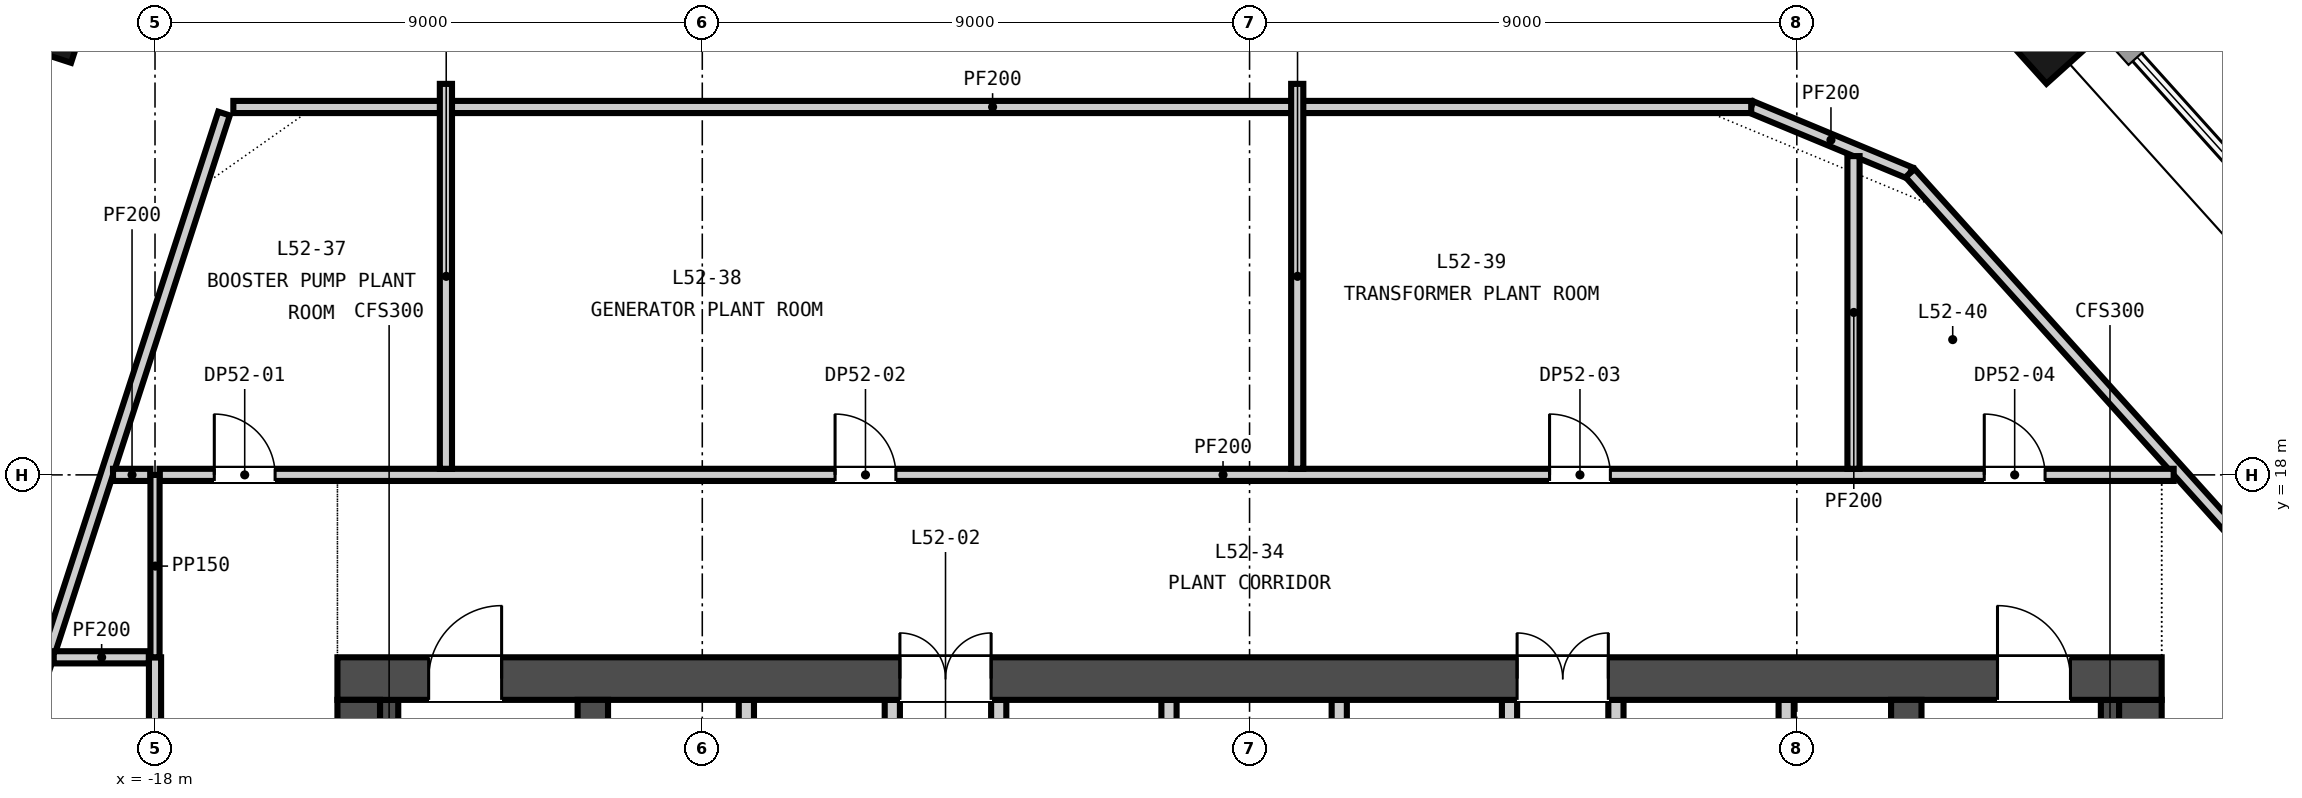
"""IFC4 building model, lengths in metres.
Left out: names, types, materials, properties, quantities, classifications, styles, units other than length and angle.
Written with IfcOpenShell. Run it as: python <this file> out.ifc"""

import sys

from ifc_helpers import new_model, si_unit, direction, frame, frame_2d, origin, origin_2d, place, context, subcontext, project, spatial, rectangle, extrude, element, fill, save


model = new_model("IFC4")
c1 = context("Model", 3, precision=1e-05, world=origin(), true_north=direction((0.0, 1.0)))
c2 = subcontext(c1, "Body", "Model", "MODEL_VIEW")
j1 = project(units=[si_unit("LENGTHUNIT", "METRE"), si_unit("PLANEANGLEUNIT", "RADIAN")], contexts=[c1])
p1 = place(None, origin())
s1 = spatial("IfcSite", under=j1, at=p1, CompositionType="ELEMENT")
p2 = place(p1, origin())
s2 = spatial("IfcBuilding", under=s1, at=p2, CompositionType="ELEMENT")
p3 = place(p2, frame((0.0, 0.0, 207.3)))
s3 = spatial("IfcBuildingStorey", under=s2, at=p3, CompositionType="ELEMENT", Elevation=207.3)
p4 = place(p3, frame((-15.0, 14.65, -0.3), z_axis=(0.0, 0.0, 1.0), x_axis=(1.0, 0.0, 0.0)))
e1 = element("IfcWall", 1, at=p4, inside=s3, PredefinedType="SOLIDWALL", context=c2, shape_type="SweptSolid", body=[
    extrude(rectangle(XDim=30.0, YDim=0.7, at=frame_2d((15.0, 0.0))), origin(), (0.0, 0.0, 1.0), 4.5),
])
p5 = place(p4, frame((9.25, 0.0, 0.3)))
e2 = element("IfcOpeningElement", 2, at=p5, cuts=e1, PredefinedType="OPENING", context=c2, shape_type="SweptSolid", body=[
    extrude(rectangle(XDim=1.5, YDim=2.1, at=frame_2d((0.75, 1.05))), frame((0.0, 0.36, 0.0), z_axis=(0.0, -1.0, 0.0), x_axis=(1.0, 0.0, 0.0)), (0.0, 0.0, 1.0), 0.72),
])
p6 = place(p4, frame((19.4, 0.0, 0.3)))
e3 = element("IfcOpeningElement", 3, at=p6, cuts=e1, PredefinedType="OPENING", context=c2, shape_type="SweptSolid", body=[
    extrude(rectangle(XDim=1.5, YDim=2.1, at=frame_2d((0.75, 1.05))), frame((0.0, 0.36, 0.0), z_axis=(0.0, -1.0, 0.0), x_axis=(1.0, 0.0, 0.0)), (0.0, 0.0, 1.0), 0.72),
])
p7 = place(p4, frame((1.5, 0.0, 0.3)))
e4 = element("IfcOpeningElement", 4, at=p7, cuts=e1, PredefinedType="OPENING", context=c2, shape_type="SweptSolid", body=[
    extrude(rectangle(XDim=1.2, YDim=2.1, at=frame_2d((0.6, 1.05))), frame((0.0, 0.36, 0.0), z_axis=(0.0, -1.0, 0.0), x_axis=(1.0, 0.0, 0.0)), (0.0, 0.0, 1.0), 0.72),
])
p8 = place(p4, frame((27.3, 0.0, 0.3)))
e5 = element("IfcOpeningElement", 5, at=p8, cuts=e1, PredefinedType="OPENING", context=c2, shape_type="SweptSolid", body=[
    extrude(rectangle(XDim=1.2, YDim=2.1, at=frame_2d((0.6, 1.05))), frame((0.0, 0.36, 0.0), z_axis=(0.0, -1.0, 0.0), x_axis=(1.0, 0.0, 0.0)), (0.0, 0.0, 1.0), 0.72),
])
for number, where, z_axis, x_axis in (
    (6, (-14.65, 0.7, -0.3), (0.0, 0.0, 1.0), (0.0, 1.0, 0.0)),
    (7, (14.65, 0.7, -0.3), (0.0, 0.0, 1.0), (0.0, 1.0, 0.0)),
):
    element("IfcWall", number, at=place(p3, frame(where, z_axis=z_axis, x_axis=x_axis)), inside=s3, PredefinedType="SOLIDWALL", context=c2, shape_type="SweptSolid", body=[
        extrude(rectangle(XDim=13.6, YDim=0.7, at=frame_2d((6.8, 0.0))), origin(), (0.0, 0.0, 1.0), 4.5),
    ])
for number, where, z_axis, x_axis in (
    (8, (-10.8, 0.7, -0.3), (0.0, 0.0, 1.0), (0.0, 1.0, 0.0)),
    (9, (10.8, 0.7, -0.3), (0.0, 0.0, 1.0), (0.0, 1.0, 0.0)),
):
    element("IfcWall", number, at=place(p3, frame(where, z_axis=z_axis, x_axis=x_axis)), inside=s3, PredefinedType="SOLIDWALL", context=c2, shape_type="SweptSolid", body=[
        extrude(rectangle(XDim=13.6, YDim=0.5, at=frame_2d((6.8, 0.0))), origin(), (0.0, 0.0, 1.0), 4.5),
    ])
for number, where, z_axis, x_axis in (
    (10, (-19.798, 25.596, -0.3), (0.0, 0.0, 1.0), (-0.309, -0.951, 0.0)),
    (11, (13.154, 25.351, -0.3), (0.0, 0.0, 1.0), (-0.669, 0.743, 0.0)),
):
    element("IfcColumn", number, at=place(p3, frame(where, z_axis=z_axis, x_axis=x_axis)), inside=s3, PredefinedType="COLUMN", context=c2, shape_type="SweptSolid", body=[
        extrude(rectangle(XDim=1.3, YDim=1.3, at=origin_2d()), origin(), (0.0, 0.0, 1.0), 4.5),
    ])
for number, where, z_axis, x_axis in (
    (12, (-8.275, 11.3, 0.0), (0.0, 0.0, 1.0), (0.0, 1.0, 0.0)),
    (13, (-5.875, 11.3, 0.0), (0.0, 0.0, 1.0), (0.0, 1.0, 0.0)),
    (14, (-4.125, 11.3, 0.0), (0.0, 0.0, 1.0), (0.0, 1.0, 0.0)),
    (15, (-1.325, 11.3, 0.0), (0.0, 0.0, 1.0), (0.0, 1.0, 0.0)),
    (16, (1.475, 11.3, 0.0), (0.0, 0.0, 1.0), (0.0, 1.0, 0.0)),
    (17, (4.275, 11.3, 0.0), (0.0, 0.0, 1.0), (0.0, 1.0, 0.0)),
    (18, (6.025, 11.3, 0.0), (0.0, 0.0, 1.0), (0.0, 1.0, 0.0)),
    (19, (8.825, 11.3, 0.0), (0.0, 0.0, 1.0), (0.0, 1.0, 0.0)),
):
    element("IfcWall", number, at=place(p3, frame(where, z_axis=z_axis, x_axis=x_axis)), inside=s3, PredefinedType="PARTITIONING", context=c2, shape_type="SweptSolid", body=[
        extrude(rectangle(XDim=3.0, YDim=0.25, at=frame_2d((1.5, 0.0))), origin(), (0.0, 0.0, 1.0), 4.2),
    ])
for number, where, z_axis, x_axis in (
    (20, (-14.15, 0.7, 0.0), (0.0, 0.0, 1.0), (0.0, 1.0, 0.0)),
    (21, (14.15, 0.7, 0.0), (0.0, 0.0, 1.0), (0.0, 1.0, 0.0)),
):
    element("IfcWall", number, at=place(p3, frame(where, z_axis=z_axis, x_axis=x_axis)), inside=s3, PredefinedType="SOLIDWALL", context=c2, shape_type="SweptSolid", body=[
        extrude(rectangle(XDim=13.6, YDim=0.3, at=frame_2d((6.8, 0.0))), origin(), (0.0, 0.0, 1.0), 4.2),
    ])
p9 = place(p3, frame((-19.665, 15.0, 0.0), z_axis=(0.0, 0.0, 1.0), x_axis=(1.0, 0.0, 0.0)))
e22 = element("IfcWall", 22, at=p9, inside=s3, PredefinedType="PARTITIONING", context=c2, shape_type="SweptSolid", body=[
    extrude(rectangle(XDim=1.565, YDim=0.2, at=frame_2d((0.783, 0.0))), origin(), (0.0, 0.0, 1.0), 4.2),
])
p10 = place(p3, frame((-18.691, 18.0, 0.0), z_axis=(0.0, 0.0, 1.0), x_axis=(1.0, 0.0, 0.0)))
e23 = element("IfcWall", 23, at=p10, inside=s3, PredefinedType="PARTITIONING", context=c2, shape_type="SweptSolid", body=[
    extrude(rectangle(XDim=0.616, YDim=0.2, at=frame_2d((0.308, 0.0))), origin(), (0.0, 0.0, 1.0), 4.2),
])
p11 = place(p3, frame((-17.925, 18.0, 0.0), z_axis=(0.0, 0.0, 1.0), x_axis=(1.0, 0.0, 0.0)))
e24 = element("IfcWall", 24, at=p11, inside=s3, PredefinedType="PARTITIONING", context=c2, shape_type="SweptSolid", body=[
    extrude(rectangle(XDim=33.122, YDim=0.2, at=frame_2d((16.561, 0.0))), origin(), (0.0, 0.0, 1.0), 4.2),
])
p12 = place(p11, frame((0.9, 0.0, 0.0)))
e25 = element("IfcOpeningElement", 25, at=p12, cuts=e24, PredefinedType="OPENING", context=c2, shape_type="SweptSolid", body=[
    extrude(rectangle(XDim=1.0, YDim=2.1, at=frame_2d((0.5, 1.05))), frame((0.0, 0.11, 0.0), z_axis=(0.0, -1.0, 0.0), x_axis=(1.0, 0.0, 0.0)), (0.0, 0.0, 1.0), 0.22),
])
p13 = place(p11, frame((11.109, 0.0, 0.0)))
e26 = element("IfcOpeningElement", 26, at=p13, cuts=e24, PredefinedType="OPENING", context=c2, shape_type="SweptSolid", body=[
    extrude(rectangle(XDim=1.0, YDim=2.1, at=frame_2d((0.5, 1.05))), frame((0.0, 0.11, 0.0), z_axis=(0.0, -1.0, 0.0), x_axis=(1.0, 0.0, 0.0)), (0.0, 0.0, 1.0), 0.22),
])
p14 = place(p11, frame((22.859, 0.0, 0.0)))
e27 = element("IfcOpeningElement", 27, at=p14, cuts=e24, PredefinedType="OPENING", context=c2, shape_type="SweptSolid", body=[
    extrude(rectangle(XDim=1.0, YDim=2.1, at=frame_2d((0.5, 1.05))), frame((0.0, 0.11, 0.0), z_axis=(0.0, -1.0, 0.0), x_axis=(1.0, 0.0, 0.0)), (0.0, 0.0, 1.0), 0.22),
])
p15 = place(p11, frame((30.008, 0.0, 0.0)))
e28 = element("IfcOpeningElement", 28, at=p15, cuts=e24, PredefinedType="OPENING", context=c2, shape_type="SweptSolid", body=[
    extrude(rectangle(XDim=1.0, YDim=2.1, at=frame_2d((0.5, 1.05))), frame((0.0, 0.11, 0.0), z_axis=(0.0, -1.0, 0.0), x_axis=(1.0, 0.0, 0.0)), (0.0, 0.0, 1.0), 0.22),
])
p16 = place(p3, frame((-18.0, 0.0, 0.0), z_axis=(0.0, 0.0, 1.0), x_axis=(0.0, 1.0, 0.0)))
e29 = element("IfcWall", 29, at=p16, inside=s3, PredefinedType="PARTITIONING", context=c2, shape_type="SweptSolid", body=[
    extrude(rectangle(XDim=15.0, YDim=0.2, at=frame_2d((7.5, 0.0))), origin(), (0.0, 0.0, 1.0), 4.2),
])
p17 = place(p16, frame((6.9, 0.0, 0.0)))
e30 = element("IfcOpeningElement", 30, at=p17, cuts=e29, PredefinedType="OPENING", context=c2, shape_type="SweptSolid", body=[
    extrude(rectangle(XDim=1.0, YDim=2.1, at=frame_2d((0.5, 1.05))), frame((0.0, 0.11, 0.0), z_axis=(0.0, -1.0, 0.0), x_axis=(1.0, 0.0, 0.0)), (0.0, 0.0, 1.0), 0.22),
])
p18 = place(p3, frame((-18.0, 15.001, 0.0), z_axis=(0.0, 0.0, 1.0), x_axis=(0.0, 1.0, 0.0)))
e31 = element("IfcWall", 31, at=p18, inside=s3, PredefinedType="PARTITIONING", context=c2, shape_type="SweptSolid", body=[
    extrude(rectangle(XDim=2.998, YDim=0.15, at=frame_2d((1.499, 0.0))), origin(), (0.0, 0.0, 1.0), 4.2),
])
for number, where, z_axis, x_axis in (
    (32, (-13.216, 18.1, 0.0), (0.0, 0.0, 1.0), (0.0, 1.0, 0.0)),
    (33, (0.784, 18.1, 0.0), (0.0, 0.0, 1.0), (0.0, 1.0, 0.0)),
):
    element("IfcWall", number, at=place(p3, frame(where, z_axis=z_axis, x_axis=x_axis)), inside=s3, PredefinedType="PARTITIONING", context=c2, shape_type="SweptSolid", body=[
        extrude(rectangle(XDim=6.33, YDim=0.2, at=frame_2d((3.165, 0.0))), origin(), (0.0, 0.0, 1.0), 4.2),
    ])
p19 = place(p3, frame((9.932, 18.1, 0.0), z_axis=(0.0, 0.0, 1.0), x_axis=(0.0, 1.0, 0.0)))
e34 = element("IfcWall", 34, at=p19, inside=s3, PredefinedType="PARTITIONING", context=c2, shape_type="SweptSolid", body=[
    extrude(rectangle(XDim=5.142, YDim=0.2, at=frame_2d((2.571, 0.0))), origin(), (0.0, 0.0, 1.0), 4.2),
])
p20 = place(p3, frame((8.25, 24.05, 0.0), z_axis=(0.0, 0.0, 1.0), x_axis=(0.923344746626, -0.383971976683, 0.0)))
e35 = element("IfcWall", 35, at=p20, inside=s3, PredefinedType="PARTITIONING", context=c2, shape_type="SweptSolid", body=[
    extrude(rectangle(XDim=2.829, YDim=0.2, at=frame_2d((1.415, 0.0))), origin(), (0.0, 0.0, 1.0), 4.2),
])
p21 = place(p3, frame((10.863, 22.964, 0.0), z_axis=(0.0, 0.0, 1.0), x_axis=(0.669131375447, -0.743144132987, 0.0)))
e36 = element("IfcWall", 36, at=p21, inside=s3, PredefinedType="PARTITIONING", context=c2, shape_type="SweptSolid", body=[
    extrude(rectangle(XDim=27.355, YDim=0.2, at=frame_2d((13.678, 0.0))), origin(), (0.0, 0.0, 1.0), 4.2),
])
p22 = place(p3, frame((-25.318, -2.075, 0.0), z_axis=(0.0, 0.0, 1.0), x_axis=(0.309016450058, 0.951056693154, 0.0)))
e37 = element("IfcWall", 37, at=p22, inside=s3, PredefinedType="PARTITIONING", context=c2, shape_type="SweptSolid", body=[
    extrude(rectangle(XDim=27.356, YDim=0.2, at=frame_2d((13.678, 0.0))), origin(), (0.0, 0.0, 1.0), 4.2),
])
p23 = place(p3, frame((-16.712, 24.05, 0.0), z_axis=(0.0, 0.0, 1.0), x_axis=(1.0, 0.0, 0.0)))
e38 = element("IfcWall", 38, at=p23, inside=s3, PredefinedType="PARTITIONING", context=c2, shape_type="SweptSolid", body=[
    extrude(rectangle(XDim=24.962, YDim=0.2, at=frame_2d((12.481, 0.0))), origin(), (0.0, 0.0, 1.0), 4.2),
])
p24 = place(p5, origin())
e39 = element("IfcDoor", 39, at=p24, inside=s3, OperationType="DOUBLE_DOOR_SINGLE_SWING", PredefinedType="DOOR", context=c2, shape_type="SweptSolid", body=[
    extrude(rectangle(XDim=1.5, YDim=2.1, at=frame_2d((0.75, 1.05))), frame((0.0, 0.025, 0.0), z_axis=(0.0, -1.0, 0.0), x_axis=(1.0, 0.0, 0.0)), (0.0, 0.0, 1.0), 0.05),
])
fill(e2, e39)
p25 = place(p6, origin())
e40 = element("IfcDoor", 40, at=p25, inside=s3, OperationType="DOUBLE_DOOR_SINGLE_SWING", PredefinedType="DOOR", context=c2, shape_type="SweptSolid", body=[
    extrude(rectangle(XDim=1.5, YDim=2.1, at=frame_2d((0.75, 1.05))), frame((0.0, 0.025, 0.0), z_axis=(0.0, -1.0, 0.0), x_axis=(1.0, 0.0, 0.0)), (0.0, 0.0, 1.0), 0.05),
])
fill(e3, e40)
p26 = place(p7, origin())
e41 = element("IfcDoor", 41, at=p26, inside=s3, OperationType="SINGLE_SWING_RIGHT", PredefinedType="DOOR", context=c2, shape_type="SweptSolid", body=[
    extrude(rectangle(XDim=1.2, YDim=2.1, at=frame_2d((0.6, 1.05))), frame((0.0, 0.025, 0.0), z_axis=(0.0, -1.0, 0.0), x_axis=(1.0, 0.0, 0.0)), (0.0, 0.0, 1.0), 0.05),
])
fill(e4, e41)
p27 = place(p8, origin())
e42 = element("IfcDoor", 42, at=p27, inside=s3, OperationType="SINGLE_SWING_LEFT", PredefinedType="DOOR", context=c2, shape_type="SweptSolid", body=[
    extrude(rectangle(XDim=1.2, YDim=2.1, at=frame_2d((0.6, 1.05))), frame((0.0, 0.025, 0.0), z_axis=(0.0, -1.0, 0.0), x_axis=(1.0, 0.0, 0.0)), (0.0, 0.0, 1.0), 0.05),
])
fill(e5, e42)
p28 = place(p12, origin())
e43 = element("IfcDoor", 43, at=p28, inside=s3, OperationType="SINGLE_SWING_LEFT", PredefinedType="DOOR", context=c2, shape_type="SweptSolid", body=[
    extrude(rectangle(XDim=1.0, YDim=2.1, at=frame_2d((0.5, 1.05))), frame((0.0, 0.025, 0.0), z_axis=(0.0, -1.0, 0.0), x_axis=(1.0, 0.0, 0.0)), (0.0, 0.0, 1.0), 0.05),
])
fill(e25, e43)
p29 = place(p13, origin())
e44 = element("IfcDoor", 44, at=p29, inside=s3, OperationType="SINGLE_SWING_LEFT", PredefinedType="DOOR", context=c2, shape_type="SweptSolid", body=[
    extrude(rectangle(XDim=1.0, YDim=2.1, at=frame_2d((0.5, 1.05))), frame((0.0, 0.025, 0.0), z_axis=(0.0, -1.0, 0.0), x_axis=(1.0, 0.0, 0.0)), (0.0, 0.0, 1.0), 0.05),
])
fill(e26, e44)
p30 = place(p14, origin())
e45 = element("IfcDoor", 45, at=p30, inside=s3, OperationType="SINGLE_SWING_LEFT", PredefinedType="DOOR", context=c2, shape_type="SweptSolid", body=[
    extrude(rectangle(XDim=1.0, YDim=2.1, at=frame_2d((0.5, 1.05))), frame((0.0, 0.025, 0.0), z_axis=(0.0, -1.0, 0.0), x_axis=(1.0, 0.0, 0.0)), (0.0, 0.0, 1.0), 0.05),
])
fill(e27, e45)
p31 = place(p15, origin())
e46 = element("IfcDoor", 46, at=p31, inside=s3, OperationType="SINGLE_SWING_LEFT", PredefinedType="DOOR", context=c2, shape_type="SweptSolid", body=[
    extrude(rectangle(XDim=1.0, YDim=2.1, at=frame_2d((0.5, 1.05))), frame((0.0, 0.025, 0.0), z_axis=(0.0, -1.0, 0.0), x_axis=(1.0, 0.0, 0.0)), (0.0, 0.0, 1.0), 0.05),
])
fill(e28, e46)
save(model, sys.argv[1])
